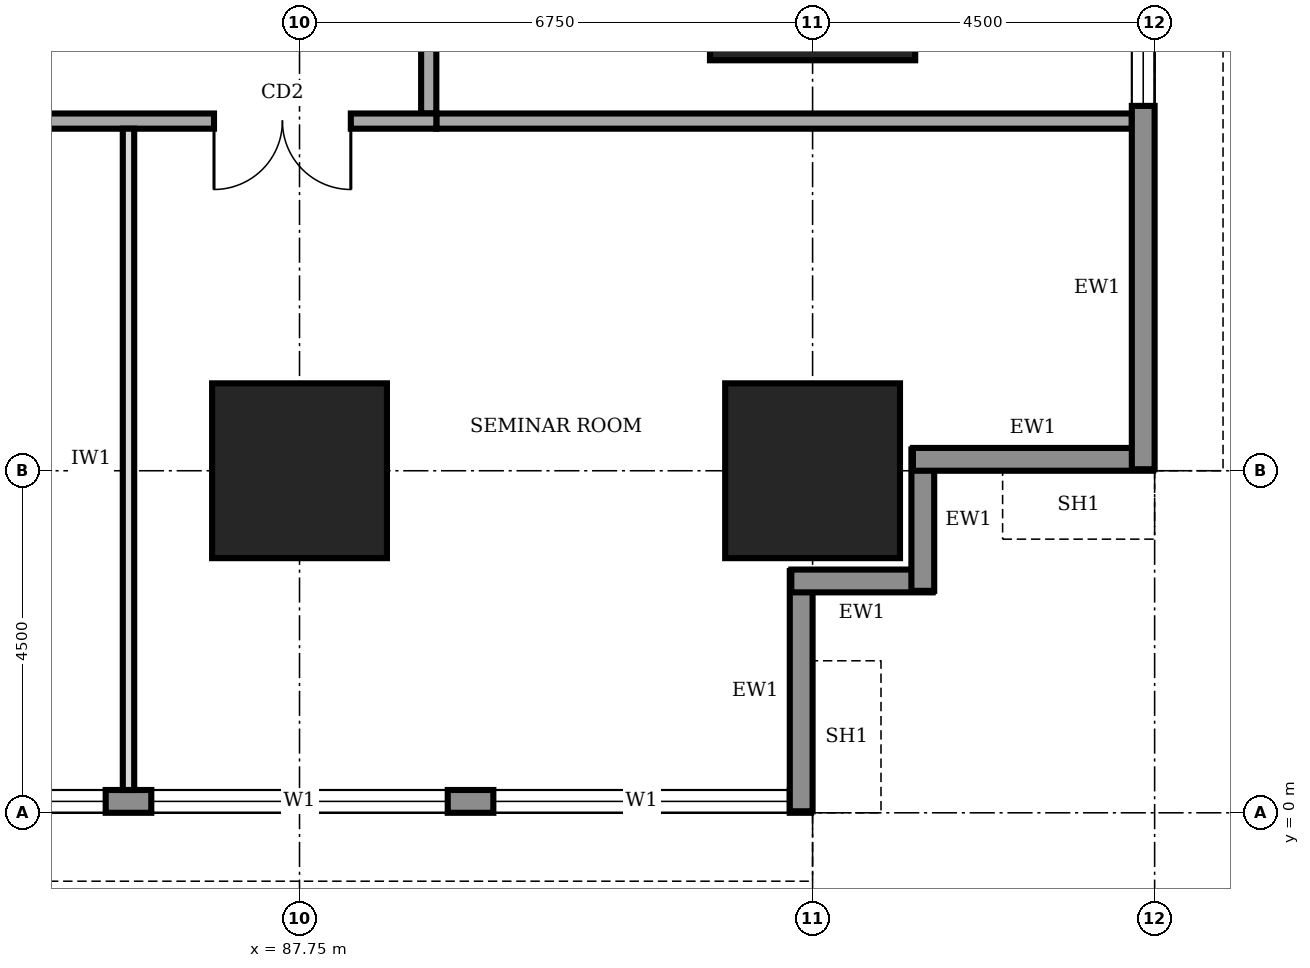
"""IFC4 building model, lengths in metres.
Left out: names, types, materials, properties, quantities, classifications, styles, units other than length and angle.
Written with IfcOpenShell. Run it as: python <this file> out.ifc"""

import sys

from ifc_helpers import new_model, si_unit, direction, frame, frame_2d, origin, origin_2d, place, context, subcontext, project, spatial, rectangle, extrude, element, fill, save


model = new_model("IFC4")
c1 = context("Model", 3, precision=1e-05, world=origin(), true_north=direction((0.0, 1.0)))
c2 = subcontext(c1, "Body", "Model", "MODEL_VIEW")
j1 = project(units=[si_unit("LENGTHUNIT", "METRE"), si_unit("PLANEANGLEUNIT", "RADIAN")], contexts=[c1])
p1 = place(None, origin())
s1 = spatial("IfcSite", under=j1, at=p1, CompositionType="ELEMENT")
p2 = place(p1, origin())
s2 = spatial("IfcBuilding", under=s1, at=p2, CompositionType="ELEMENT")
p3 = place(p2, frame((0.0, 0.0, 33.0)))
s3 = spatial("IfcBuildingStorey", under=s2, at=p3, CompositionType="ELEMENT", Elevation=33.0)
for number, where, z_axis, x_axis in (
    (1, (87.75, 4.5, 0.0), (0.0, 0.0, 1.0), (1.0, 0.0, 0.0)),
    (2, (94.5, 4.5, 0.0), (0.0, 0.0, 1.0), (1.0, 0.0, 0.0)),
):
    element("IfcColumn", number, at=place(p3, frame(where, z_axis=z_axis, x_axis=x_axis)), inside=s3, PredefinedType="COLUMN", context=c2, shape_type="SweptSolid", body=[
        extrude(rectangle(XDim=2.3, YDim=2.3, at=origin_2d()), origin(), (0.0, 0.0, 1.0), 4.0),
    ])
p4 = place(p3, frame((94.5, 11.25, 0.0), z_axis=(0.0, 0.0, 1.0), x_axis=(1.0, 0.0, 0.0)))
e3 = element("IfcColumn", 3, at=p4, inside=s3, PredefinedType="COLUMN", context=c2, shape_type="SweptSolid", body=[
    extrude(rectangle(XDim=2.7, YDim=2.7, at=origin_2d()), origin(), (0.0, 0.0, 1.0), 4.0),
])
p5 = place(p3, frame((67.52, 0.15, 0.0), z_axis=(0.0, 0.0, 1.0), x_axis=(1.0, 0.0, 0.0)))
e4 = element("IfcWall", 4, at=p5, inside=s3, PredefinedType="STANDARD", context=c2, shape_type="SweptSolid", body=[
    extrude(rectangle(XDim=26.96, YDim=0.3, at=frame_2d((13.48, 0.0))), origin(), (0.0, 0.0, 1.0), 3.75),
])
p6 = place(p5, frame((4.78, 0.0, 0.9)))
e5 = element("IfcOpeningElement", 5, at=p6, cuts=e4, PredefinedType="OPENING", context=c2, shape_type="SweptSolid", body=[
    extrude(rectangle(XDim=3.9, YDim=2.2, at=frame_2d((1.95, 1.1))), frame((0.0, 0.16, 0.0), z_axis=(0.0, -1.0, 0.0), x_axis=(1.0, 0.0, 0.0)), (0.0, 0.0, 1.0), 0.32),
])
p7 = place(p5, frame((9.28, 0.0, 0.9)))
e6 = element("IfcOpeningElement", 6, at=p7, cuts=e4, PredefinedType="OPENING", context=c2, shape_type="SweptSolid", body=[
    extrude(rectangle(XDim=3.9, YDim=2.2, at=frame_2d((1.95, 1.1))), frame((0.0, 0.16, 0.0), z_axis=(0.0, -1.0, 0.0), x_axis=(1.0, 0.0, 0.0)), (0.0, 0.0, 1.0), 0.32),
])
p8 = place(p5, frame((13.78, 0.0, 0.9)))
e7 = element("IfcOpeningElement", 7, at=p8, cuts=e4, PredefinedType="OPENING", context=c2, shape_type="SweptSolid", body=[
    extrude(rectangle(XDim=3.9, YDim=2.2, at=frame_2d((1.95, 1.1))), frame((0.0, 0.16, 0.0), z_axis=(0.0, -1.0, 0.0), x_axis=(1.0, 0.0, 0.0)), (0.0, 0.0, 1.0), 0.32),
])
p9 = place(p5, frame((18.28, 0.0, 0.9)))
e8 = element("IfcOpeningElement", 8, at=p9, cuts=e4, PredefinedType="OPENING", context=c2, shape_type="SweptSolid", body=[
    extrude(rectangle(XDim=3.9, YDim=2.2, at=frame_2d((1.95, 1.1))), frame((0.0, 0.16, 0.0), z_axis=(0.0, -1.0, 0.0), x_axis=(1.0, 0.0, 0.0)), (0.0, 0.0, 1.0), 0.32),
])
p10 = place(p5, frame((22.78, 0.0, 0.9)))
e9 = element("IfcOpeningElement", 9, at=p10, cuts=e4, PredefinedType="OPENING", context=c2, shape_type="SweptSolid", body=[
    extrude(rectangle(XDim=3.9, YDim=2.2, at=frame_2d((1.95, 1.1))), frame((0.0, 0.16, 0.0), z_axis=(0.0, -1.0, 0.0), x_axis=(1.0, 0.0, 0.0)), (0.0, 0.0, 1.0), 0.32),
])
p11 = place(p3, frame((94.35, 0.02, 0.0), z_axis=(0.0, 0.0, 1.0), x_axis=(0.0, 1.0, 0.0)))
e10 = element("IfcWall", 10, at=p11, inside=s3, PredefinedType="STANDARD", context=c2, shape_type="SweptSolid", body=[
    extrude(rectangle(XDim=3.16, YDim=0.3, at=frame_2d((1.58, 0.0))), origin(), (0.0, 0.0, 1.0), 2.85),
])
for number, where, z_axis, x_axis in (
    (11, (94.22, 3.05, 0.0), (0.0, 0.0, 1.0), (1.0, 0.0, 0.0)),
    (12, (95.95, 2.92, 0.0), (0.0, 0.0, 1.0), (0.0, 1.0, 0.0)),
):
    element("IfcWall", number, at=place(p3, frame(where, z_axis=z_axis, x_axis=x_axis)), inside=s3, PredefinedType="STANDARD", context=c2, shape_type="SweptSolid", body=[
        extrude(rectangle(XDim=1.86, YDim=0.3, at=frame_2d((0.93, 0.0))), origin(), (0.0, 0.0, 1.0), 3.75),
    ])
p12 = place(p3, frame((95.82, 4.65, 0.0), z_axis=(0.0, 0.0, 1.0), x_axis=(1.0, 0.0, 0.0)))
e13 = element("IfcWall", 13, at=p12, inside=s3, PredefinedType="STANDARD", context=c2, shape_type="SweptSolid", body=[
    extrude(rectangle(XDim=3.16, YDim=0.3, at=frame_2d((1.58, 0.0))), origin(), (0.0, 0.0, 1.0), 2.85),
])
p13 = place(p3, frame((98.85, 4.52, 0.0), z_axis=(0.0, 0.0, 1.0), x_axis=(0.0, 1.0, 0.0)))
e14 = element("IfcWall", 14, at=p13, inside=s3, PredefinedType="STANDARD", context=c2, shape_type="SweptSolid", body=[
    extrude(rectangle(XDim=31.46, YDim=0.3, at=frame_2d((15.73, 0.0))), origin(), (0.0, 0.0, 1.0), 3.75),
])
p14 = place(p13, frame((4.78, 0.0, 0.9)))
e15 = element("IfcOpeningElement", 15, at=p14, cuts=e14, PredefinedType="OPENING", context=c2, shape_type="SweptSolid", body=[
    extrude(rectangle(XDim=3.9, YDim=2.2, at=frame_2d((1.95, 1.1))), frame((0.0, 0.16, 0.0), z_axis=(0.0, -1.0, 0.0), x_axis=(1.0, 0.0, 0.0)), (0.0, 0.0, 1.0), 0.32),
])
p15 = place(p13, frame((9.28, 0.0, 0.9)))
e16 = element("IfcOpeningElement", 16, at=p15, cuts=e14, PredefinedType="OPENING", context=c2, shape_type="SweptSolid", body=[
    extrude(rectangle(XDim=3.9, YDim=2.2, at=frame_2d((1.95, 1.1))), frame((0.0, 0.16, 0.0), z_axis=(0.0, -1.0, 0.0), x_axis=(1.0, 0.0, 0.0)), (0.0, 0.0, 1.0), 0.32),
])
p16 = place(p13, frame((13.78, 0.0, 0.9)))
e17 = element("IfcOpeningElement", 17, at=p16, cuts=e14, PredefinedType="OPENING", context=c2, shape_type="SweptSolid", body=[
    extrude(rectangle(XDim=3.9, YDim=2.2, at=frame_2d((1.95, 1.1))), frame((0.0, 0.16, 0.0), z_axis=(0.0, -1.0, 0.0), x_axis=(1.0, 0.0, 0.0)), (0.0, 0.0, 1.0), 0.32),
])
p17 = place(p13, frame((18.28, 0.0, 0.9)))
e18 = element("IfcOpeningElement", 18, at=p17, cuts=e14, PredefinedType="OPENING", context=c2, shape_type="SweptSolid", body=[
    extrude(rectangle(XDim=3.9, YDim=2.2, at=frame_2d((1.95, 1.1))), frame((0.0, 0.16, 0.0), z_axis=(0.0, -1.0, 0.0), x_axis=(1.0, 0.0, 0.0)), (0.0, 0.0, 1.0), 0.32),
])
p18 = place(p13, frame((22.78, 0.0, 0.9)))
e19 = element("IfcOpeningElement", 19, at=p18, cuts=e14, PredefinedType="OPENING", context=c2, shape_type="SweptSolid", body=[
    extrude(rectangle(XDim=3.9, YDim=2.2, at=frame_2d((1.95, 1.1))), frame((0.0, 0.16, 0.0), z_axis=(0.0, -1.0, 0.0), x_axis=(1.0, 0.0, 0.0)), (0.0, 0.0, 1.0), 0.32),
])
p19 = place(p13, frame((27.28, 0.0, 0.9)))
e20 = element("IfcOpeningElement", 20, at=p19, cuts=e14, PredefinedType="OPENING", context=c2, shape_type="SweptSolid", body=[
    extrude(rectangle(XDim=3.9, YDim=2.2, at=frame_2d((1.95, 1.1))), frame((0.0, 0.16, 0.0), z_axis=(0.0, -1.0, 0.0), x_axis=(1.0, 0.0, 0.0)), (0.0, 0.0, 1.0), 0.32),
])
p20 = place(p3, frame((72.65, 9.1, 0.0), z_axis=(0.0, 0.0, 1.0), x_axis=(1.0, 0.0, 0.0)))
e21 = element("IfcWall", 21, at=p20, inside=s3, PredefinedType="SOLIDWALL", context=c2, shape_type="SweptSolid", body=[
    extrude(rectangle(XDim=16.9, YDim=0.2, at=frame_2d((8.45, 0.0))), origin(), (0.0, 0.0, 1.0), 3.75),
])
p21 = place(p20, frame((0.925, 0.0, 0.0)))
e22 = element("IfcOpeningElement", 22, at=p21, cuts=e21, PredefinedType="OPENING", context=c2, shape_type="SweptSolid", body=[
    extrude(rectangle(XDim=1.8, YDim=2.1, at=frame_2d((0.9, 1.05))), frame((0.0, 0.11, 0.0), z_axis=(0.0, -1.0, 0.0), x_axis=(1.0, 0.0, 0.0)), (0.0, 0.0, 1.0), 0.22),
])
p22 = place(p20, frame((7.85, 0.0, 0.0)))
e23 = element("IfcOpeningElement", 23, at=p22, cuts=e21, PredefinedType="OPENING", context=c2, shape_type="SweptSolid", body=[
    extrude(rectangle(XDim=1.0, YDim=2.1, at=frame_2d((0.5, 1.05))), frame((0.0, 0.11, 0.0), z_axis=(0.0, -1.0, 0.0), x_axis=(1.0, 0.0, 0.0)), (0.0, 0.0, 1.0), 0.22),
])
p23 = place(p20, frame((13.975, 0.0, 0.0)))
e24 = element("IfcOpeningElement", 24, at=p23, cuts=e21, PredefinedType="OPENING", context=c2, shape_type="SweptSolid", body=[
    extrude(rectangle(XDim=1.8, YDim=2.1, at=frame_2d((0.9, 1.05))), frame((0.0, 0.11, 0.0), z_axis=(0.0, -1.0, 0.0), x_axis=(1.0, 0.0, 0.0)), (0.0, 0.0, 1.0), 0.22),
])
p24 = place(p3, frame((89.45, 9.2, 0.0), z_axis=(0.0, 0.0, 1.0), x_axis=(0.0, 1.0, 0.0)))
e25 = element("IfcWall", 25, at=p24, inside=s3, PredefinedType="SOLIDWALL", context=c2, shape_type="SweptSolid", body=[
    extrude(rectangle(XDim=23.8, YDim=0.2, at=frame_2d((11.9, 0.0))), origin(), (0.0, 0.0, 1.0), 3.75),
])
p25 = place(p24, frame((1.55, 0.0, 0.0)))
e26 = element("IfcOpeningElement", 26, at=p25, cuts=e25, PredefinedType="OPENING", context=c2, shape_type="SweptSolid", body=[
    extrude(rectangle(XDim=1.0, YDim=2.1, at=frame_2d((0.5, 1.05))), frame((0.0, 0.11, 0.0), z_axis=(0.0, -1.0, 0.0), x_axis=(1.0, 0.0, 0.0)), (0.0, 0.0, 1.0), 0.22),
])
p26 = place(p24, frame((5.05, 0.0, 0.0)))
e27 = element("IfcOpeningElement", 27, at=p26, cuts=e25, PredefinedType="OPENING", context=c2, shape_type="SweptSolid", body=[
    extrude(rectangle(XDim=0.9, YDim=2.1, at=frame_2d((0.45, 1.05))), frame((0.0, 0.11, 0.0), z_axis=(0.0, -1.0, 0.0), x_axis=(1.0, 0.0, 0.0)), (0.0, 0.0, 1.0), 0.22),
])
p27 = place(p24, frame((8.25, 0.0, 0.0)))
e28 = element("IfcOpeningElement", 28, at=p27, cuts=e25, PredefinedType="OPENING", context=c2, shape_type="SweptSolid", body=[
    extrude(rectangle(XDim=0.9, YDim=2.1, at=frame_2d((0.45, 1.05))), frame((0.0, 0.11, 0.0), z_axis=(0.0, -1.0, 0.0), x_axis=(1.0, 0.0, 0.0)), (0.0, 0.0, 1.0), 0.22),
])
p28 = place(p24, frame((13.8, 0.0, 0.0)))
e29 = element("IfcOpeningElement", 29, at=p28, cuts=e25, PredefinedType="OPENING", context=c2, shape_type="SweptSolid", body=[
    extrude(rectangle(XDim=0.9, YDim=2.1, at=frame_2d((0.45, 1.05))), frame((0.0, 0.11, 0.0), z_axis=(0.0, -1.0, 0.0), x_axis=(1.0, 0.0, 0.0)), (0.0, 0.0, 1.0), 0.22),
])
p29 = place(p24, frame((16.3, 0.0, 0.0)))
e30 = element("IfcOpeningElement", 30, at=p29, cuts=e25, PredefinedType="OPENING", context=c2, shape_type="SweptSolid", body=[
    extrude(rectangle(XDim=1.0, YDim=2.1, at=frame_2d((0.5, 1.05))), frame((0.0, 0.11, 0.0), z_axis=(0.0, -1.0, 0.0), x_axis=(1.0, 0.0, 0.0)), (0.0, 0.0, 1.0), 0.22),
])
p30 = place(p24, frame((11.2, 0.0, 0.0)))
e31 = element("IfcOpeningElement", 31, at=p30, cuts=e25, PredefinedType="OPENING", context=c2, shape_type="SweptSolid", body=[
    extrude(rectangle(XDim=1.0, YDim=2.1, at=frame_2d((0.5, 1.05))), frame((0.0, 0.11, 0.0), z_axis=(0.0, -1.0, 0.0), x_axis=(1.0, 0.0, 0.0)), (0.0, 0.0, 1.0), 0.22),
])
p31 = place(p24, frame((20.3, 0.0, 0.0)))
e32 = element("IfcOpeningElement", 32, at=p31, cuts=e25, PredefinedType="OPENING", context=c2, shape_type="SweptSolid", body=[
    extrude(rectangle(XDim=1.0, YDim=2.1, at=frame_2d((0.5, 1.05))), frame((0.0, 0.11, 0.0), z_axis=(0.0, -1.0, 0.0), x_axis=(1.0, 0.0, 0.0)), (0.0, 0.0, 1.0), 0.22),
])
p32 = place(p3, frame((89.55, 9.1, 0.0), z_axis=(0.0, 0.0, 1.0), x_axis=(1.0, 0.0, 0.0)))
e33 = element("IfcWall", 33, at=p32, inside=s3, PredefinedType="SOLIDWALL", context=c2, shape_type="SweptSolid", body=[
    extrude(rectangle(XDim=9.15, YDim=0.2, at=frame_2d((4.575, 0.0))), origin(), (0.0, 0.0, 1.0), 3.75),
])
p33 = place(p3, frame((85.5, 0.3, 0.0), z_axis=(0.0, 0.0, 1.0), x_axis=(0.0, 1.0, 0.0)))
e34 = element("IfcWall", 34, at=p33, inside=s3, PredefinedType="PARTITIONING", context=c2, shape_type="SweptSolid", body=[
    extrude(rectangle(XDim=8.7, YDim=0.15, at=frame_2d((4.35, 0.0))), origin(), (0.0, 0.0, 1.0), 3.75),
])
p34 = place(p8, origin())
e35 = element("IfcWindow", 35, at=p34, inside=s3, PartitioningType="SINGLE_PANEL", PredefinedType="WINDOW", context=c2, shape_type="SweptSolid", body=[
    extrude(rectangle(XDim=3.9, YDim=2.2, at=frame_2d((1.95, 1.1))), frame((0.0, 0.03, 0.0), z_axis=(0.0, -1.0, 0.0), x_axis=(1.0, 0.0, 0.0)), (0.0, 0.0, 1.0), 0.06),
])
fill(e7, e35)
p35 = place(p9, origin())
e36 = element("IfcWindow", 36, at=p35, inside=s3, PartitioningType="SINGLE_PANEL", PredefinedType="WINDOW", context=c2, shape_type="SweptSolid", body=[
    extrude(rectangle(XDim=3.9, YDim=2.2, at=frame_2d((1.95, 1.1))), frame((0.0, 0.03, 0.0), z_axis=(0.0, -1.0, 0.0), x_axis=(1.0, 0.0, 0.0)), (0.0, 0.0, 1.0), 0.06),
])
fill(e8, e36)
p36 = place(p10, origin())
e37 = element("IfcWindow", 37, at=p36, inside=s3, PartitioningType="SINGLE_PANEL", PredefinedType="WINDOW", context=c2, shape_type="SweptSolid", body=[
    extrude(rectangle(XDim=3.9, YDim=2.2, at=frame_2d((1.95, 1.1))), frame((0.0, 0.03, 0.0), z_axis=(0.0, -1.0, 0.0), x_axis=(1.0, 0.0, 0.0)), (0.0, 0.0, 1.0), 0.06),
])
fill(e9, e37)
p37 = place(p14, origin())
e38 = element("IfcWindow", 38, at=p37, inside=s3, PartitioningType="SINGLE_PANEL", PredefinedType="WINDOW", context=c2, shape_type="SweptSolid", body=[
    extrude(rectangle(XDim=3.9, YDim=2.2, at=frame_2d((1.95, 1.1))), frame((0.0, 0.03, 0.0), z_axis=(0.0, -1.0, 0.0), x_axis=(1.0, 0.0, 0.0)), (0.0, 0.0, 1.0), 0.06),
])
fill(e15, e38)
p38 = place(p23, frame((1.8, 0.0, 0.0), z_axis=(0.0, 0.0, 1.0), x_axis=(-1.0, 0.0, 0.0)))
e39 = element("IfcDoor", 39, at=p38, inside=s3, OperationType="DOUBLE_DOOR_SINGLE_SWING", PredefinedType="DOOR", context=c2, shape_type="SweptSolid", body=[
    extrude(rectangle(XDim=1.8, YDim=2.1, at=frame_2d((0.9, 1.05))), frame((0.0, 0.025, 0.0), z_axis=(0.0, -1.0, 0.0), x_axis=(1.0, 0.0, 0.0)), (0.0, 0.0, 1.0), 0.05),
])
fill(e24, e39)
save(model, sys.argv[1])
